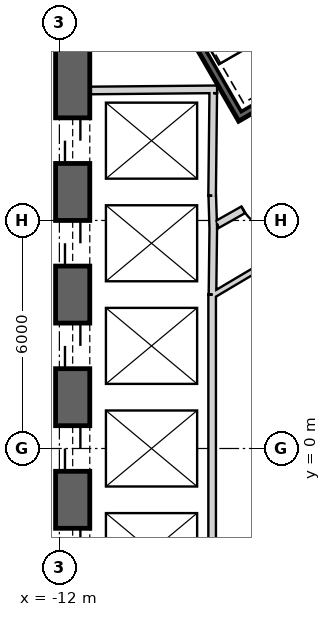
"""IFC4 building model, lengths in metres.
Left out: names, types, materials, properties, quantities, classifications, styles, units other than length and angle.
Written with IfcOpenShell. Run it as: python <this file> out.ifc"""

import sys

from ifc_helpers import new_model, si_unit, direction, frame, frame_2d, origin, place, context, subcontext, project, spatial, rectangle, extrude, element, fill, save


model = new_model("IFC4")
c1 = context("Model", 3, precision=1e-05, world=origin(), true_north=direction((0.0, 1.0)))
c2 = subcontext(c1, "Body", "Model", "MODEL_VIEW")
j1 = project(units=[si_unit("LENGTHUNIT", "METRE"), si_unit("PLANEANGLEUNIT", "RADIAN")], contexts=[c1])
p1 = place(None, origin())
s1 = spatial("IfcSite", under=j1, at=p1, CompositionType="ELEMENT")
p2 = place(p1, origin())
s2 = spatial("IfcBuilding", under=s1, at=p2, CompositionType="ELEMENT")
p3 = place(p2, frame((0.0, 0.0, 15.5)))
s3 = spatial("IfcBuildingStorey", under=s2, at=p3, CompositionType="ELEMENT", Elevation=15.5)
p4 = place(p3, frame((19.475, 2.208, 0.0), z_axis=(0.0, 0.0, 1.0), x_axis=(-0.866028369851, 0.499994862586, 0.0)))
e1 = element("IfcWall", 1, at=p4, inside=s3, PredefinedType="SHEAR", context=c2, shape_type="SweptSolid", body=[
    extrude(rectangle(XDim=31.523, YDim=0.9, at=frame_2d((15.762, 0.0))), origin(), (0.0, 0.0, 1.0), 6.0),
])
p5 = place(p4, frame((7.062, 0.0, 0.0)))
e2 = element("IfcOpeningElement", 2, at=p5, cuts=e1, PredefinedType="OPENING", context=c2, shape_type="SweptSolid", body=[
    extrude(rectangle(XDim=1.2, YDim=2.4, at=frame_2d((0.6, 1.2))), frame((0.0, 0.46, 0.0), z_axis=(0.0, -1.0, 0.0), x_axis=(1.0, 0.0, 0.0)), (0.0, 0.0, 1.0), 0.92),
])
p6 = place(p4, frame((9.762, 0.0, 0.0)))
e3 = element("IfcOpeningElement", 3, at=p6, cuts=e1, PredefinedType="OPENING", context=c2, shape_type="SweptSolid", body=[
    extrude(rectangle(XDim=1.2, YDim=2.4, at=frame_2d((0.6, 1.2))), frame((0.0, 0.46, 0.0), z_axis=(0.0, -1.0, 0.0), x_axis=(1.0, 0.0, 0.0)), (0.0, 0.0, 1.0), 0.92),
])
p7 = place(p4, frame((12.462, 0.0, 0.0)))
e4 = element("IfcOpeningElement", 4, at=p7, cuts=e1, PredefinedType="OPENING", context=c2, shape_type="SweptSolid", body=[
    extrude(rectangle(XDim=1.2, YDim=2.4, at=frame_2d((0.6, 1.2))), frame((0.0, 0.46, 0.0), z_axis=(0.0, -1.0, 0.0), x_axis=(1.0, 0.0, 0.0)), (0.0, 0.0, 1.0), 0.92),
])
p8 = place(p4, frame((15.162, 0.0, 0.0)))
e5 = element("IfcOpeningElement", 5, at=p8, cuts=e1, PredefinedType="OPENING", context=c2, shape_type="SweptSolid", body=[
    extrude(rectangle(XDim=1.2, YDim=2.4, at=frame_2d((0.6, 1.2))), frame((0.0, 0.46, 0.0), z_axis=(0.0, -1.0, 0.0), x_axis=(1.0, 0.0, 0.0)), (0.0, 0.0, 1.0), 0.92),
])
p9 = place(p4, frame((17.862, 0.0, 0.0)))
e6 = element("IfcOpeningElement", 6, at=p9, cuts=e1, PredefinedType="OPENING", context=c2, shape_type="SweptSolid", body=[
    extrude(rectangle(XDim=1.2, YDim=2.4, at=frame_2d((0.6, 1.2))), frame((0.0, 0.46, 0.0), z_axis=(0.0, -1.0, 0.0), x_axis=(1.0, 0.0, 0.0)), (0.0, 0.0, 1.0), 0.92),
])
p10 = place(p4, frame((20.562, 0.0, 0.0)))
e7 = element("IfcOpeningElement", 7, at=p10, cuts=e1, PredefinedType="OPENING", context=c2, shape_type="SweptSolid", body=[
    extrude(rectangle(XDim=1.2, YDim=2.4, at=frame_2d((0.6, 1.2))), frame((0.0, 0.46, 0.0), z_axis=(0.0, -1.0, 0.0), x_axis=(1.0, 0.0, 0.0)), (0.0, 0.0, 1.0), 0.92),
])
p11 = place(p4, frame((23.262, 0.0, 0.0)))
e8 = element("IfcOpeningElement", 8, at=p11, cuts=e1, PredefinedType="OPENING", context=c2, shape_type="SweptSolid", body=[
    extrude(rectangle(XDim=1.2, YDim=2.4, at=frame_2d((0.6, 1.2))), frame((0.0, 0.46, 0.0), z_axis=(0.0, -1.0, 0.0), x_axis=(1.0, 0.0, 0.0)), (0.0, 0.0, 1.0), 0.92),
])
p12 = place(p4, frame((3.612, 0.0, 0.0)))
e9 = element("IfcOpeningElement", 9, at=p12, cuts=e1, PredefinedType="OPENING", context=c2, shape_type="SweptSolid", body=[
    extrude(rectangle(XDim=1.2, YDim=2.4, at=frame_2d((0.6, 1.2))), frame((0.0, 0.46, 0.0), z_axis=(0.0, -1.0, 0.0), x_axis=(1.0, 0.0, 0.0)), (0.0, 0.0, 1.0), 0.92),
])
p13 = place(p4, frame((26.712, 0.0, 0.0)))
e10 = element("IfcOpeningElement", 10, at=p13, cuts=e1, PredefinedType="OPENING", context=c2, shape_type="SweptSolid", body=[
    extrude(rectangle(XDim=1.2, YDim=2.4, at=frame_2d((0.6, 1.2))), frame((0.0, 0.46, 0.0), z_axis=(0.0, -1.0, 0.0), x_axis=(1.0, 0.0, 0.0)), (0.0, 0.0, 1.0), 0.92),
])
p14 = place(p3, frame((-11.65, 15.762, 0.0), z_axis=(0.0, 0.0, 1.0), x_axis=(0.0, -1.0, 0.0)))
e11 = element("IfcWall", 11, at=p14, inside=s3, PredefinedType="SHEAR", context=c2, shape_type="SweptSolid", body=[
    extrude(rectangle(XDim=31.523, YDim=0.9, at=frame_2d((15.762, 0.0))), origin(), (0.0, 0.0, 1.0), 6.0),
])
p15 = place(p14, frame((7.062, 0.0, 0.0)))
e12 = element("IfcOpeningElement", 12, at=p15, cuts=e11, PredefinedType="OPENING", context=c2, shape_type="SweptSolid", body=[
    extrude(rectangle(XDim=1.2, YDim=2.4, at=frame_2d((0.6, 1.2))), frame((0.0, 0.46, 0.0), z_axis=(0.0, -1.0, 0.0), x_axis=(1.0, 0.0, 0.0)), (0.0, 0.0, 1.0), 0.92),
])
p16 = place(p14, frame((9.762, 0.0, 0.0)))
e13 = element("IfcOpeningElement", 13, at=p16, cuts=e11, PredefinedType="OPENING", context=c2, shape_type="SweptSolid", body=[
    extrude(rectangle(XDim=1.2, YDim=2.4, at=frame_2d((0.6, 1.2))), frame((0.0, 0.46, 0.0), z_axis=(0.0, -1.0, 0.0), x_axis=(1.0, 0.0, 0.0)), (0.0, 0.0, 1.0), 0.92),
])
p17 = place(p14, frame((12.462, 0.0, 0.0)))
e14 = element("IfcOpeningElement", 14, at=p17, cuts=e11, PredefinedType="OPENING", context=c2, shape_type="SweptSolid", body=[
    extrude(rectangle(XDim=1.2, YDim=2.4, at=frame_2d((0.6, 1.2))), frame((0.0, 0.46, 0.0), z_axis=(0.0, -1.0, 0.0), x_axis=(1.0, 0.0, 0.0)), (0.0, 0.0, 1.0), 0.92),
])
p18 = place(p14, frame((15.162, 0.0, 0.0)))
e15 = element("IfcOpeningElement", 15, at=p18, cuts=e11, PredefinedType="OPENING", context=c2, shape_type="SweptSolid", body=[
    extrude(rectangle(XDim=1.2, YDim=2.4, at=frame_2d((0.6, 1.2))), frame((0.0, 0.46, 0.0), z_axis=(0.0, -1.0, 0.0), x_axis=(1.0, 0.0, 0.0)), (0.0, 0.0, 1.0), 0.92),
])
p19 = place(p14, frame((17.862, 0.0, 0.0)))
e16 = element("IfcOpeningElement", 16, at=p19, cuts=e11, PredefinedType="OPENING", context=c2, shape_type="SweptSolid", body=[
    extrude(rectangle(XDim=1.2, YDim=2.4, at=frame_2d((0.6, 1.2))), frame((0.0, 0.46, 0.0), z_axis=(0.0, -1.0, 0.0), x_axis=(1.0, 0.0, 0.0)), (0.0, 0.0, 1.0), 0.92),
])
p20 = place(p14, frame((20.562, 0.0, 0.0)))
e17 = element("IfcOpeningElement", 17, at=p20, cuts=e11, PredefinedType="OPENING", context=c2, shape_type="SweptSolid", body=[
    extrude(rectangle(XDim=1.2, YDim=2.4, at=frame_2d((0.6, 1.2))), frame((0.0, 0.46, 0.0), z_axis=(0.0, -1.0, 0.0), x_axis=(1.0, 0.0, 0.0)), (0.0, 0.0, 1.0), 0.92),
])
p21 = place(p14, frame((23.262, 0.0, 0.0)))
e18 = element("IfcOpeningElement", 18, at=p21, cuts=e11, PredefinedType="OPENING", context=c2, shape_type="SweptSolid", body=[
    extrude(rectangle(XDim=1.2, YDim=2.4, at=frame_2d((0.6, 1.2))), frame((0.0, 0.46, 0.0), z_axis=(0.0, -1.0, 0.0), x_axis=(1.0, 0.0, 0.0)), (0.0, 0.0, 1.0), 0.92),
])
p22 = place(p14, frame((3.612, 0.0, 0.0)))
e19 = element("IfcOpeningElement", 19, at=p22, cuts=e11, PredefinedType="OPENING", context=c2, shape_type="SweptSolid", body=[
    extrude(rectangle(XDim=1.2, YDim=2.4, at=frame_2d((0.6, 1.2))), frame((0.0, 0.46, 0.0), z_axis=(0.0, -1.0, 0.0), x_axis=(1.0, 0.0, 0.0)), (0.0, 0.0, 1.0), 0.92),
])
p23 = place(p14, frame((26.712, 0.0, 0.0)))
e20 = element("IfcOpeningElement", 20, at=p23, cuts=e11, PredefinedType="OPENING", context=c2, shape_type="SweptSolid", body=[
    extrude(rectangle(XDim=1.2, YDim=2.4, at=frame_2d((0.6, 1.2))), frame((0.0, 0.46, 0.0), z_axis=(0.0, -1.0, 0.0), x_axis=(1.0, 0.0, 0.0)), (0.0, 0.0, 1.0), 0.92),
])
p24 = place(p3, frame((-7.825, -17.97, 0.0), z_axis=(0.0, 0.0, 1.0), x_axis=(0.866028369851, 0.499994862586, 0.0)))
e21 = element("IfcWall", 21, at=p24, inside=s3, PredefinedType="SHEAR", context=c2, shape_type="SweptSolid", body=[
    extrude(rectangle(XDim=31.523, YDim=0.9, at=frame_2d((15.762, 0.0))), origin(), (0.0, 0.0, 1.0), 6.0),
])
p25 = place(p24, frame((7.062, 0.0, 0.0)))
e22 = element("IfcOpeningElement", 22, at=p25, cuts=e21, PredefinedType="OPENING", context=c2, shape_type="SweptSolid", body=[
    extrude(rectangle(XDim=1.2, YDim=2.4, at=frame_2d((0.6, 1.2))), frame((0.0, 0.46, 0.0), z_axis=(0.0, -1.0, 0.0), x_axis=(1.0, 0.0, 0.0)), (0.0, 0.0, 1.0), 0.92),
])
p26 = place(p24, frame((9.762, 0.0, 0.0)))
e23 = element("IfcOpeningElement", 23, at=p26, cuts=e21, PredefinedType="OPENING", context=c2, shape_type="SweptSolid", body=[
    extrude(rectangle(XDim=1.2, YDim=2.4, at=frame_2d((0.6, 1.2))), frame((0.0, 0.46, 0.0), z_axis=(0.0, -1.0, 0.0), x_axis=(1.0, 0.0, 0.0)), (0.0, 0.0, 1.0), 0.92),
])
p27 = place(p24, frame((12.462, 0.0, 0.0)))
e24 = element("IfcOpeningElement", 24, at=p27, cuts=e21, PredefinedType="OPENING", context=c2, shape_type="SweptSolid", body=[
    extrude(rectangle(XDim=1.2, YDim=2.4, at=frame_2d((0.6, 1.2))), frame((0.0, 0.46, 0.0), z_axis=(0.0, -1.0, 0.0), x_axis=(1.0, 0.0, 0.0)), (0.0, 0.0, 1.0), 0.92),
])
p28 = place(p24, frame((15.162, 0.0, 0.0)))
e25 = element("IfcOpeningElement", 25, at=p28, cuts=e21, PredefinedType="OPENING", context=c2, shape_type="SweptSolid", body=[
    extrude(rectangle(XDim=1.2, YDim=2.4, at=frame_2d((0.6, 1.2))), frame((0.0, 0.46, 0.0), z_axis=(0.0, -1.0, 0.0), x_axis=(1.0, 0.0, 0.0)), (0.0, 0.0, 1.0), 0.92),
])
p29 = place(p24, frame((17.862, 0.0, 0.0)))
e26 = element("IfcOpeningElement", 26, at=p29, cuts=e21, PredefinedType="OPENING", context=c2, shape_type="SweptSolid", body=[
    extrude(rectangle(XDim=1.2, YDim=2.4, at=frame_2d((0.6, 1.2))), frame((0.0, 0.46, 0.0), z_axis=(0.0, -1.0, 0.0), x_axis=(1.0, 0.0, 0.0)), (0.0, 0.0, 1.0), 0.92),
])
p30 = place(p24, frame((20.562, 0.0, 0.0)))
e27 = element("IfcOpeningElement", 27, at=p30, cuts=e21, PredefinedType="OPENING", context=c2, shape_type="SweptSolid", body=[
    extrude(rectangle(XDim=1.2, YDim=2.4, at=frame_2d((0.6, 1.2))), frame((0.0, 0.46, 0.0), z_axis=(0.0, -1.0, 0.0), x_axis=(1.0, 0.0, 0.0)), (0.0, 0.0, 1.0), 0.92),
])
p31 = place(p24, frame((26.712, 0.0, 0.0)))
e28 = element("IfcOpeningElement", 28, at=p31, cuts=e21, PredefinedType="OPENING", context=c2, shape_type="SweptSolid", body=[
    extrude(rectangle(XDim=1.2, YDim=2.4, at=frame_2d((0.6, 1.2))), frame((0.0, 0.46, 0.0), z_axis=(0.0, -1.0, 0.0), x_axis=(1.0, 0.0, 0.0)), (0.0, 0.0, 1.0), 0.92),
])
p32 = place(p24, frame((3.612, 0.0, 0.0)))
e29 = element("IfcOpeningElement", 29, at=p32, cuts=e21, PredefinedType="OPENING", context=c2, shape_type="SweptSolid", body=[
    extrude(rectangle(XDim=1.2, YDim=2.4, at=frame_2d((0.6, 1.2))), frame((0.0, 0.46, 0.0), z_axis=(0.0, -1.0, 0.0), x_axis=(1.0, 0.0, 0.0)), (0.0, 0.0, 1.0), 0.92),
])
p33 = place(p3, frame((-11.2, 9.42, 0.0), z_axis=(0.0, 0.0, 1.0), x_axis=(0.999957167047, 0.009255488683, 0.0)))
e30 = element("IfcWall", 30, at=p33, inside=s3, PredefinedType="PLUMBINGWALL", context=c2, shape_type="SweptSolid", body=[
    extrude(rectangle(XDim=3.35, YDim=0.2, at=frame_2d((1.675, 0.0))), origin(), (0.0, 0.0, 1.0), 5.7),
])
p34 = place(p3, frame((-7.951, 9.35, 0.0), z_axis=(0.0, 0.0, 1.0), x_axis=(-0.011120469654, -0.999938165666, 0.0)))
e31 = element("IfcWall", 31, at=p34, inside=s3, PredefinedType="PLUMBINGWALL", context=c2, shape_type="SweptSolid", body=[
    extrude(rectangle(XDim=2.7, YDim=0.2, at=frame_2d((1.35, 0.0))), origin(), (0.0, 0.0, 1.0), 5.7),
])
p35 = place(p3, frame((-7.977, 6.65, 0.0), z_axis=(0.0, 0.0, 1.0), x_axis=(0.030861509705, -0.999523670164, 0.0)))
e32 = element("IfcWall", 32, at=p35, inside=s3, PredefinedType="PLUMBINGWALL", context=c2, shape_type="SweptSolid", body=[
    extrude(rectangle(XDim=0.878, YDim=0.2, at=frame_2d((0.439, 0.0))), origin(), (0.0, 0.0, 1.0), 5.7),
])
p36 = place(p3, frame((-7.949, 5.895, 0.0), z_axis=(0.0, 0.0, 1.0), x_axis=(-0.012042535896, -0.999927486035, 0.0)))
e33 = element("IfcWall", 33, at=p36, inside=s3, PredefinedType="PLUMBINGWALL", context=c2, shape_type="SweptSolid", body=[
    extrude(rectangle(XDim=1.845, YDim=0.2, at=frame_2d((0.922, 0.0))), origin(), (0.0, 0.0, 1.0), 5.7),
])
p37 = place(p3, frame((-7.98, 4.05, 0.0), z_axis=(0.0, 0.0, 1.0), x_axis=(0.0, -1.0, 0.0)))
e34 = element("IfcWall", 34, at=p37, inside=s3, PredefinedType="PLUMBINGWALL", context=c2, shape_type="SweptSolid", body=[
    extrude(rectangle(XDim=8.1, YDim=0.2, at=frame_2d((4.05, 0.0))), origin(), (0.0, 0.0, 1.0), 5.7),
])
p38 = place(p3, frame((-11.245, 15.678, -0.3), z_axis=(0.0, 0.0, 1.0), x_axis=(0.499977274689, -0.866038523851, 0.0)))
e35 = element("IfcWall", 35, at=p38, inside=s3, PredefinedType="SHEAR", context=c2, shape_type="SweptSolid", body=[
    extrude(rectangle(XDim=8.1, YDim=0.2, at=frame_2d((4.05, 0.0))), origin(), (0.0, 0.0, 1.0), 6.0),
])
p39 = place(p3, frame((-7.159, 8.8, -0.3), z_axis=(0.0, 0.0, 1.0), x_axis=(0.866047807691, 0.499961193289, 0.0)))
e36 = element("IfcWall", 36, at=p39, inside=s3, PredefinedType="SHEAR", context=c2, shape_type="SweptSolid", body=[
    extrude(rectangle(XDim=3.6, YDim=0.2, at=frame_2d((1.8, 0.0))), origin(), (0.0, 0.0, 1.0), 6.0),
])
p40 = place(p39, frame((1.25, 0.0, 0.3)))
e37 = element("IfcOpeningElement", 37, at=p40, cuts=e36, PredefinedType="OPENING", context=c2, shape_type="SweptSolid", body=[
    extrude(rectangle(XDim=1.1, YDim=2.1, at=frame_2d((0.55, 1.05))), frame((0.0, 0.11, 0.0), z_axis=(0.0, -1.0, 0.0), x_axis=(1.0, 0.0, 0.0)), (0.0, 0.0, 1.0), 0.22),
])
p41 = place(p3, frame((-5.6, 7.16, 0.0), z_axis=(0.0, 0.0, 1.0), x_axis=(-0.871363259478, -0.490638431059, 0.0)))
e38 = element("IfcWall", 38, at=p41, inside=s3, PredefinedType="PARTITIONING", context=c2, shape_type="SweptSolid", body=[
    extrude(rectangle(XDim=2.581, YDim=0.2, at=frame_2d((1.291, 0.0))), origin(), (0.0, 0.0, 1.0), 5.7),
])
p42 = place(p41, frame((0.791, 0.0, 0.0)))
e39 = element("IfcOpeningElement", 39, at=p42, cuts=e38, PredefinedType="OPENING", context=c2, shape_type="SweptSolid", body=[
    extrude(rectangle(XDim=1.0, YDim=2.1, at=frame_2d((0.5, 1.05))), frame((0.0, 0.11, 0.0), z_axis=(0.0, -1.0, 0.0), x_axis=(1.0, 0.0, 0.0)), (0.0, 0.0, 1.0), 0.22),
])
p43 = place(p3, frame((-6.024, 5.183, 0.0), z_axis=(0.0, 0.0, 1.0), x_axis=(-0.860126804455, -0.510080268447, 0.0)))
e40 = element("IfcWall", 40, at=p43, inside=s3, PredefinedType="PLUMBINGWALL", context=c2, shape_type="SweptSolid", body=[
    extrude(rectangle(XDim=2.24, YDim=0.15, at=frame_2d((1.12, 0.0))), origin(), (0.0, 0.0, 1.0), 5.7),
])
p44 = place(p42, origin())
e41 = element("IfcDoor", 41, at=p44, inside=s3, OperationType="SINGLE_SWING_LEFT", PredefinedType="USERDEFINED", context=c2, shape_type="SweptSolid", body=[
    extrude(rectangle(XDim=1.0, YDim=2.1, at=frame_2d((0.5, 1.05))), frame((0.0, 0.025, 0.0), z_axis=(0.0, -1.0, 0.0), x_axis=(1.0, 0.0, 0.0)), (0.0, 0.0, 1.0), 0.05),
])
fill(e39, e41)
p45 = place(p15, origin())
e42 = element("IfcDoor", 42, at=p45, inside=s3, OperationType="SLIDING_TO_LEFT", PredefinedType="USERDEFINED", context=c2, shape_type="SweptSolid", body=[
    extrude(rectangle(XDim=1.2, YDim=2.4, at=frame_2d((0.6, 1.2))), frame((0.0, 0.025, 0.0), z_axis=(0.0, -1.0, 0.0), x_axis=(1.0, 0.0, 0.0)), (0.0, 0.0, 1.0), 0.05),
])
fill(e12, e42)
p46 = place(p16, origin())
e43 = element("IfcDoor", 43, at=p46, inside=s3, OperationType="SLIDING_TO_LEFT", PredefinedType="USERDEFINED", context=c2, shape_type="SweptSolid", body=[
    extrude(rectangle(XDim=1.2, YDim=2.4, at=frame_2d((0.6, 1.2))), frame((0.0, 0.025, 0.0), z_axis=(0.0, -1.0, 0.0), x_axis=(1.0, 0.0, 0.0)), (0.0, 0.0, 1.0), 0.05),
])
fill(e13, e43)
p47 = place(p17, origin())
e44 = element("IfcDoor", 44, at=p47, inside=s3, OperationType="SLIDING_TO_LEFT", PredefinedType="USERDEFINED", context=c2, shape_type="SweptSolid", body=[
    extrude(rectangle(XDim=1.2, YDim=2.4, at=frame_2d((0.6, 1.2))), frame((0.0, 0.025, 0.0), z_axis=(0.0, -1.0, 0.0), x_axis=(1.0, 0.0, 0.0)), (0.0, 0.0, 1.0), 0.05),
])
fill(e14, e44)
p48 = place(p18, origin())
e45 = element("IfcDoor", 45, at=p48, inside=s3, OperationType="SLIDING_TO_LEFT", PredefinedType="USERDEFINED", context=c2, shape_type="SweptSolid", body=[
    extrude(rectangle(XDim=1.2, YDim=2.4, at=frame_2d((0.6, 1.2))), frame((0.0, 0.025, 0.0), z_axis=(0.0, -1.0, 0.0), x_axis=(1.0, 0.0, 0.0)), (0.0, 0.0, 1.0), 0.05),
])
fill(e15, e45)
p49 = place(p19, origin())
e46 = element("IfcDoor", 46, at=p49, inside=s3, OperationType="SLIDING_TO_LEFT", PredefinedType="USERDEFINED", context=c2, shape_type="SweptSolid", body=[
    extrude(rectangle(XDim=1.2, YDim=2.4, at=frame_2d((0.6, 1.2))), frame((0.0, 0.025, 0.0), z_axis=(0.0, -1.0, 0.0), x_axis=(1.0, 0.0, 0.0)), (0.0, 0.0, 1.0), 0.05),
])
fill(e16, e46)
save(model, sys.argv[1])
